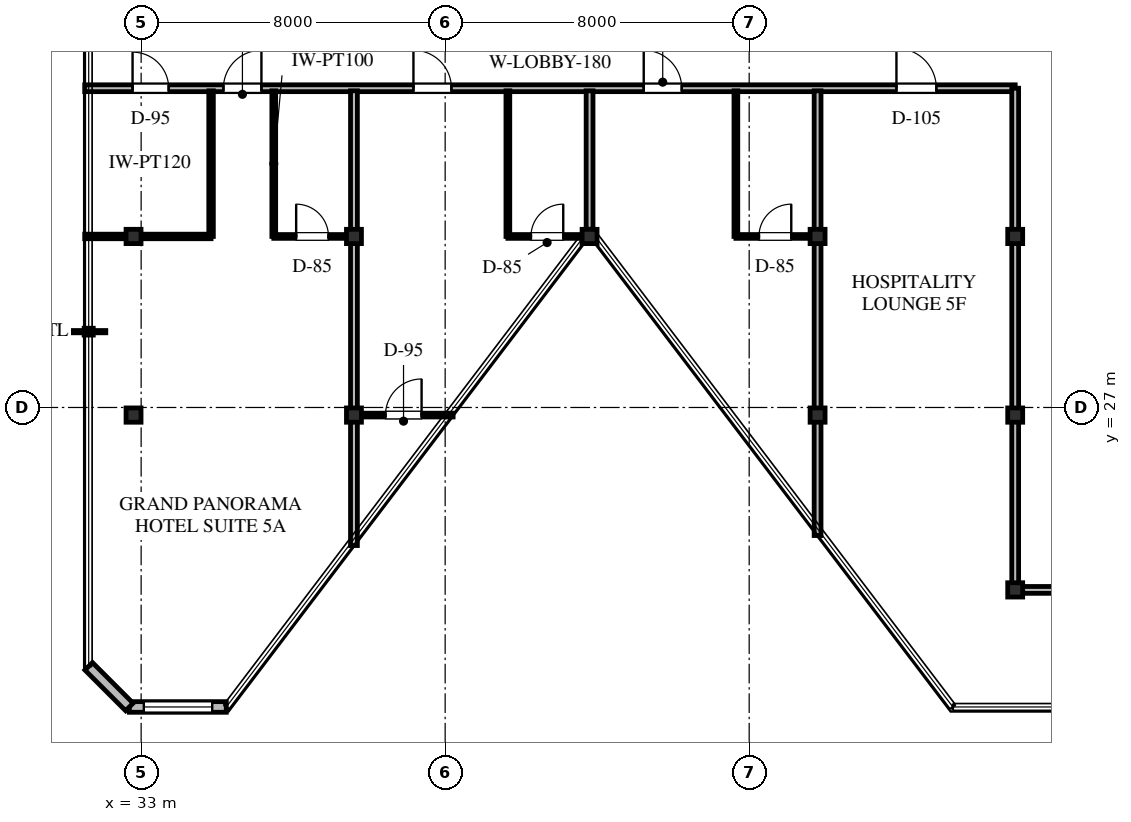
"""IFC4 building model, lengths in metres.
Left out: names, types, materials, properties, quantities, classifications, styles, units other than length and angle.
Written with IfcOpenShell. Run it as: python <this file> out.ifc"""

import sys

from ifc_helpers import new_model, si_unit, direction, frame, frame_2d, origin, origin_2d, place, context, subcontext, project, spatial, rectangle, i_section, extrude, element, fill, save


model = new_model("IFC4")
c1 = context("Model", 3, precision=1e-05, world=origin(), true_north=direction((0.0, 1.0)))
c2 = subcontext(c1, "Body", "Model", "MODEL_VIEW")
j1 = project(units=[si_unit("LENGTHUNIT", "METRE"), si_unit("PLANEANGLEUNIT", "RADIAN")], contexts=[c1])
p1 = place(None, origin())
s1 = spatial("IfcSite", under=j1, at=p1, CompositionType="ELEMENT")
p2 = place(p1, origin())
s2 = spatial("IfcBuilding", under=s1, at=p2, CompositionType="ELEMENT")
p3 = place(p2, frame((0.0, 0.0, 282.3)))
s3 = spatial("IfcBuildingStorey", under=s2, at=p3, CompositionType="ELEMENT", Elevation=282.3)
for number, where, z_axis, x_axis in (
    (1, (44.8, 31.5, 0.0), (0.0, 0.0, 1.0), (1.0, 0.0, 0.0)),
    (2, (50.8, 31.5, 0.0), (0.0, 0.0, 1.0), (1.0, 0.0, 0.0)),
    (3, (56.0, 31.5, 0.0), (0.0, 0.0, 1.0), (1.0, 0.0, 0.0)),
    (4, (38.6, 31.5, 0.0), (0.0, 0.0, 1.0), (1.0, 0.0, 0.0)),
    (5, (32.8, 31.5, 0.0), (0.0, 0.0, 1.0), (1.0, 0.0, 0.0)),
    (6, (38.6, 26.8, 0.0), (0.0, 0.0, 1.0), (1.0, 0.0, 0.0)),
    (7, (50.8, 26.8, 0.0), (0.0, 0.0, 1.0), (1.0, 0.0, 0.0)),
    (8, (56.0, 26.8, 0.0), (0.0, 0.0, 1.0), (1.0, 0.0, 0.0)),
    (9, (56.0, 22.2, 0.0), (0.0, 0.0, 1.0), (1.0, 0.0, 0.0)),
    (10, (32.8, 26.8, 0.0), (0.0, 0.0, 1.0), (1.0, 0.0, 0.0)),
):
    element("IfcColumn", number, at=place(p3, frame(where, z_axis=z_axis, x_axis=x_axis)), inside=s3, PredefinedType="COLUMN", context=c2, shape_type="SweptSolid", body=[
        extrude(i_section(OverallWidth=0.394, OverallDepth=0.376, WebThickness=0.017, FlangeThickness=0.028, FilletRadius=0.03, at=origin_2d()), origin(), (0.0, 0.0, 1.0), 3.6),
    ])
p4 = place(p3, frame((35.24, 19.12, 0.0), z_axis=(0.0, 0.0, 1.0), x_axis=(-1.0, 0.0, 0.0)))
e11 = element("IfcWall", 11, at=p4, inside=s3, PredefinedType="STANDARD", context=c2, shape_type="SweptSolid", body=[
    extrude(rectangle(XDim=2.551, YDim=0.28, at=frame_2d((1.275, 0.0))), origin(), (0.0, 0.0, 1.0), 3.365),
])
p5 = place(p4, frame((0.37, 0.0, 0.65)))
e12 = element("IfcOpeningElement", 12, at=p5, cuts=e11, PredefinedType="OPENING", context=c2, shape_type="SweptSolid", body=[
    extrude(rectangle(XDim=1.8, YDim=2.1, at=frame_2d((0.9, 1.05))), frame((0.0, 0.15, 0.0), z_axis=(0.0, -1.0, 0.0), x_axis=(1.0, 0.0, 0.0)), (0.0, 0.0, 1.0), 0.3),
])
p6 = place(p3, frame((32.69, 19.12, 0.0), z_axis=(0.0, 0.0, 1.0), x_axis=(-0.707106781187, 0.707106781187, 0.0)))
e13 = element("IfcWall", 13, at=p6, inside=s3, PredefinedType="STANDARD", context=c2, shape_type="SweptSolid", body=[
    extrude(rectangle(XDim=1.513, YDim=0.28, at=frame_2d((0.756, 0.0))), origin(), (0.0, 0.0, 1.0), 3.365),
])
p7 = place(p3, frame((31.515, 35.4, 0.0), z_axis=(0.0, 0.0, 1.0), x_axis=(1.0, 0.0, 0.0)))
e14 = element("IfcWall", 14, at=p7, inside=s3, PredefinedType="STANDARD", context=c2, shape_type="SweptSolid", body=[
    extrude(rectangle(XDim=24.485, YDim=0.18, at=frame_2d((12.243, 0.0))), origin(), (0.0, 0.0, 1.0), 2.754),
])
p8 = place(p7, frame((1.259, 0.0, 0.0)))
e15 = element("IfcOpeningElement", 15, at=p8, cuts=e14, PredefinedType="OPENING", context=c2, shape_type="SweptSolid", body=[
    extrude(rectangle(XDim=0.95, YDim=2.15, at=frame_2d((0.475, 1.075))), frame((0.0, 0.1, 0.0), z_axis=(0.0, -1.0, 0.0), x_axis=(1.0, 0.0, 0.0)), (0.0, 0.0, 1.0), 0.2),
])
p9 = place(p7, frame((3.65, 0.0, 0.0)))
e16 = element("IfcOpeningElement", 16, at=p9, cuts=e14, PredefinedType="OPENING", context=c2, shape_type="SweptSolid", body=[
    extrude(rectangle(XDim=1.0, YDim=2.15, at=frame_2d((0.5, 1.075))), frame((0.0, 0.1, 0.0), z_axis=(0.0, -1.0, 0.0), x_axis=(1.0, 0.0, 0.0)), (0.0, 0.0, 1.0), 0.2),
])
p10 = place(p7, frame((8.65, 0.0, 0.0)))
e17 = element("IfcOpeningElement", 17, at=p10, cuts=e14, PredefinedType="OPENING", context=c2, shape_type="SweptSolid", body=[
    extrude(rectangle(XDim=1.0, YDim=2.15, at=frame_2d((0.5, 1.075))), frame((0.0, 0.1, 0.0), z_axis=(0.0, -1.0, 0.0), x_axis=(1.0, 0.0, 0.0)), (0.0, 0.0, 1.0), 0.2),
])
p11 = place(p7, frame((14.71, 0.0, 0.0)))
e18 = element("IfcOpeningElement", 18, at=p11, cuts=e14, PredefinedType="OPENING", context=c2, shape_type="SweptSolid", body=[
    extrude(rectangle(XDim=1.0, YDim=2.15, at=frame_2d((0.5, 1.075))), frame((0.0, 0.1, 0.0), z_axis=(0.0, -1.0, 0.0), x_axis=(1.0, 0.0, 0.0)), (0.0, 0.0, 1.0), 0.2),
])
p12 = place(p7, frame((21.36, 0.0, 0.0)))
e19 = element("IfcOpeningElement", 19, at=p12, cuts=e14, PredefinedType="OPENING", context=c2, shape_type="SweptSolid", body=[
    extrude(rectangle(XDim=1.05, YDim=2.2, at=frame_2d((0.525, 1.1))), frame((0.0, 0.1, 0.0), z_axis=(0.0, -1.0, 0.0), x_axis=(1.0, 0.0, 0.0)), (0.0, 0.0, 1.0), 0.2),
])
p13 = place(p3, frame((56.0, 22.2, 0.0), z_axis=(0.0, 0.0, 1.0), x_axis=(0.0, 1.0, 0.0)))
e20 = element("IfcWall", 20, at=p13, inside=s3, PredefinedType="STANDARD", context=c2, shape_type="SweptSolid", body=[
    extrude(rectangle(XDim=13.2, YDim=0.18, at=frame_2d((6.6, 0.0))), origin(), (0.0, 0.0, 1.0), 2.754),
])
p14 = place(p3, frame((56.0, 22.2, 0.0), z_axis=(0.0, 0.0, 1.0), x_axis=(1.0, 0.0, 0.0)))
e21 = element("IfcWall", 21, at=p14, inside=s3, PredefinedType="STANDARD", context=c2, shape_type="SweptSolid", body=[
    extrude(rectangle(XDim=2.25, YDim=0.18, at=frame_2d((1.125, 0.0))), origin(), (0.0, 0.0, 1.0), 2.754),
])
p15 = place(p3, frame((34.84, 31.5, 0.0), z_axis=(0.0, 0.0, 1.0), x_axis=(0.0, 1.0, 0.0)))
e22 = element("IfcWall", 22, at=p15, inside=s3, PredefinedType="PARTITIONING", context=c2, shape_type="SweptSolid", body=[
    extrude(rectangle(XDim=3.832, YDim=0.12, at=frame_2d((1.916, 0.0))), origin(), (0.0, 0.0, 1.0), 2.754),
])
p16 = place(p3, frame((31.515, 31.5, 0.0), z_axis=(0.0, 0.0, 1.0), x_axis=(1.0, 0.0, 0.0)))
e23 = element("IfcWall", 23, at=p16, inside=s3, PredefinedType="PARTITIONING", context=c2, shape_type="SweptSolid", body=[
    extrude(rectangle(XDim=3.325, YDim=0.12, at=frame_2d((1.663, 0.0))), origin(), (0.0, 0.0, 1.0), 2.754),
])
p17 = place(p3, frame((36.49, 31.5, 0.0), z_axis=(0.0, 0.0, 1.0), x_axis=(0.0, 1.0, 0.0)))
e24 = element("IfcWall", 24, at=p17, inside=s3, PredefinedType="PARTITIONING", context=c2, shape_type="SweptSolid", body=[
    extrude(rectangle(XDim=3.832, YDim=0.1, at=frame_2d((1.916, 0.0))), origin(), (0.0, 0.0, 1.0), 2.754),
])
p18 = place(p3, frame((36.49, 31.5, 0.0), z_axis=(0.0, 0.0, 1.0), x_axis=(1.0, 0.0, 0.0)))
e25 = element("IfcWall", 25, at=p18, inside=s3, PredefinedType="PARTITIONING", context=c2, shape_type="SweptSolid", body=[
    extrude(rectangle(XDim=2.042, YDim=0.1, at=frame_2d((1.021, 0.0))), origin(), (0.0, 0.0, 1.0), 2.754),
])
p19 = place(p18, frame((0.589, 0.0, 0.0)))
e26 = element("IfcOpeningElement", 26, at=p19, cuts=e25, PredefinedType="OPENING", context=c2, shape_type="SweptSolid", body=[
    extrude(rectangle(XDim=0.85, YDim=2.1, at=frame_2d((0.425, 1.05))), frame((0.0, 0.06, 0.0), z_axis=(0.0, -1.0, 0.0), x_axis=(1.0, 0.0, 0.0)), (0.0, 0.0, 1.0), 0.12),
])
p20 = place(p3, frame((38.6, 23.367, 0.0), z_axis=(0.0, 0.0, 1.0), x_axis=(0.0, 1.0, 0.0)))
e27 = element("IfcWall", 27, at=p20, inside=s3, PredefinedType="STANDARD", context=c2, shape_type="SweptSolid", body=[
    extrude(rectangle(XDim=11.965, YDim=0.18, at=frame_2d((5.982, 0.0))), origin(), (0.0, 0.0, 1.0), 2.754),
])
p21 = place(p3, frame((38.668, 26.8, 0.0), z_axis=(0.0, 0.0, 1.0), x_axis=(1.0, 0.0, 0.0)))
e28 = element("IfcWall", 28, at=p21, inside=s3, PredefinedType="PARTITIONING", context=c2, shape_type="SweptSolid", body=[
    extrude(rectangle(XDim=2.541, YDim=0.1, at=frame_2d((1.271, 0.0))), origin(), (0.0, 0.0, 1.0), 2.754),
])
p22 = place(p21, frame((0.762, 0.0, 0.0)))
e29 = element("IfcOpeningElement", 29, at=p22, cuts=e28, PredefinedType="OPENING", context=c2, shape_type="SweptSolid", body=[
    extrude(rectangle(XDim=0.95, YDim=2.15, at=frame_2d((0.475, 1.075))), frame((0.0, 0.06, 0.0), z_axis=(0.0, -1.0, 0.0), x_axis=(1.0, 0.0, 0.0)), (0.0, 0.0, 1.0), 0.12),
])
p23 = place(p3, frame((42.65, 31.5, 0.0), z_axis=(0.0, 0.0, 1.0), x_axis=(0.0, 1.0, 0.0)))
e30 = element("IfcWall", 30, at=p23, inside=s3, PredefinedType="PARTITIONING", context=c2, shape_type="SweptSolid", body=[
    extrude(rectangle(XDim=3.832, YDim=0.1, at=frame_2d((1.916, 0.0))), origin(), (0.0, 0.0, 1.0), 2.754),
])
p24 = place(p3, frame((42.65, 31.5, 0.0), z_axis=(0.0, 0.0, 1.0), x_axis=(1.0, 0.0, 0.0)))
e31 = element("IfcWall", 31, at=p24, inside=s3, PredefinedType="PARTITIONING", context=c2, shape_type="SweptSolid", body=[
    extrude(rectangle(XDim=2.131, YDim=0.1, at=frame_2d((1.066, 0.0))), origin(), (0.0, 0.0, 1.0), 2.754),
])
p25 = place(p24, frame((0.607, 0.0, 0.0)))
e32 = element("IfcOpeningElement", 32, at=p25, cuts=e31, PredefinedType="OPENING", context=c2, shape_type="SweptSolid", body=[
    extrude(rectangle(XDim=0.85, YDim=2.1, at=frame_2d((0.425, 1.05))), frame((0.0, 0.06, 0.0), z_axis=(0.0, -1.0, 0.0), x_axis=(1.0, 0.0, 0.0)), (0.0, 0.0, 1.0), 0.12),
])
p26 = place(p3, frame((44.8, 31.525, 0.0), z_axis=(0.0, 0.0, 1.0), x_axis=(0.0, 1.0, 0.0)))
e33 = element("IfcWall", 33, at=p26, inside=s3, PredefinedType="STANDARD", context=c2, shape_type="SweptSolid", body=[
    extrude(rectangle(XDim=3.807, YDim=0.18, at=frame_2d((1.904, 0.0))), origin(), (0.0, 0.0, 1.0), 2.754),
])
p27 = place(p3, frame((48.65, 31.5, 0.0), z_axis=(0.0, 0.0, 1.0), x_axis=(0.0, 1.0, 0.0)))
e34 = element("IfcWall", 34, at=p27, inside=s3, PredefinedType="PARTITIONING", context=c2, shape_type="SweptSolid", body=[
    extrude(rectangle(XDim=3.832, YDim=0.1, at=frame_2d((1.916, 0.0))), origin(), (0.0, 0.0, 1.0), 2.754),
])
p28 = place(p3, frame((48.65, 31.5, 0.0), z_axis=(0.0, 0.0, 1.0), x_axis=(1.0, 0.0, 0.0)))
e35 = element("IfcWall", 35, at=p28, inside=s3, PredefinedType="PARTITIONING", context=c2, shape_type="SweptSolid", body=[
    extrude(rectangle(XDim=2.082, YDim=0.1, at=frame_2d((1.041, 0.0))), origin(), (0.0, 0.0, 1.0), 2.754),
])
p29 = place(p28, frame((0.607, 0.0, 0.0)))
e36 = element("IfcOpeningElement", 36, at=p29, cuts=e35, PredefinedType="OPENING", context=c2, shape_type="SweptSolid", body=[
    extrude(rectangle(XDim=0.85, YDim=2.1, at=frame_2d((0.425, 1.05))), frame((0.0, 0.06, 0.0), z_axis=(0.0, -1.0, 0.0), x_axis=(1.0, 0.0, 0.0)), (0.0, 0.0, 1.0), 0.12),
])
p30 = place(p3, frame((50.8, 23.63, 0.0), z_axis=(0.0, 0.0, 1.0), x_axis=(0.0, 1.0, 0.0)))
e37 = element("IfcWall", 37, at=p30, inside=s3, PredefinedType="STANDARD", context=c2, shape_type="SweptSolid", body=[
    extrude(rectangle(XDim=11.702, YDim=0.18, at=frame_2d((5.851, 0.0))), origin(), (0.0, 0.0, 1.0), 2.754),
])
p31 = place(p5, origin())
e38 = element("IfcWindow", 38, at=p31, inside=s3, PartitioningType="SINGLE_PANEL", PredefinedType="WINDOW", context=c2, shape_type="SweptSolid", body=[
    extrude(rectangle(XDim=1.8, YDim=2.1, at=frame_2d((0.9, 1.05))), frame((0.0, 0.03, 0.0), z_axis=(0.0, -1.0, 0.0), x_axis=(1.0, 0.0, 0.0)), (0.0, 0.0, 1.0), 0.06),
])
fill(e12, e38)
p32 = place(p8, origin())
e39 = element("IfcDoor", 39, at=p32, inside=s3, OperationType="SINGLE_SWING_LEFT", PredefinedType="DOOR", context=c2, shape_type="SweptSolid", body=[
    extrude(rectangle(XDim=0.95, YDim=2.15, at=frame_2d((0.475, 1.075))), frame((0.0, 0.025, 0.0), z_axis=(0.0, -1.0, 0.0), x_axis=(1.0, 0.0, 0.0)), (0.0, 0.0, 1.0), 0.05),
])
fill(e15, e39)
p33 = place(p9, origin())
e40 = element("IfcDoor", 40, at=p33, inside=s3, OperationType="SINGLE_SWING_RIGHT", PredefinedType="DOOR", context=c2, shape_type="SweptSolid", body=[
    extrude(rectangle(XDim=1.0, YDim=2.15, at=frame_2d((0.5, 1.075))), frame((0.0, 0.025, 0.0), z_axis=(0.0, -1.0, 0.0), x_axis=(1.0, 0.0, 0.0)), (0.0, 0.0, 1.0), 0.05),
])
fill(e16, e40)
p34 = place(p19, origin())
e41 = element("IfcDoor", 41, at=p34, inside=s3, OperationType="SINGLE_SWING_LEFT", PredefinedType="DOOR", context=c2, shape_type="SweptSolid", body=[
    extrude(rectangle(XDim=0.85, YDim=2.1, at=frame_2d((0.425, 1.05))), frame((0.0, 0.025, 0.0), z_axis=(0.0, -1.0, 0.0), x_axis=(1.0, 0.0, 0.0)), (0.0, 0.0, 1.0), 0.05),
])
fill(e26, e41)
p35 = place(p22, origin())
e42 = element("IfcDoor", 42, at=p35, inside=s3, OperationType="SINGLE_SWING_RIGHT", PredefinedType="DOOR", context=c2, shape_type="SweptSolid", body=[
    extrude(rectangle(XDim=0.95, YDim=2.15, at=frame_2d((0.475, 1.075))), frame((0.0, 0.025, 0.0), z_axis=(0.0, -1.0, 0.0), x_axis=(1.0, 0.0, 0.0)), (0.0, 0.0, 1.0), 0.05),
])
fill(e29, e42)
p36 = place(p10, origin())
e43 = element("IfcDoor", 43, at=p36, inside=s3, OperationType="SINGLE_SWING_LEFT", PredefinedType="DOOR", context=c2, shape_type="SweptSolid", body=[
    extrude(rectangle(XDim=1.0, YDim=2.15, at=frame_2d((0.5, 1.075))), frame((0.0, 0.025, 0.0), z_axis=(0.0, -1.0, 0.0), x_axis=(1.0, 0.0, 0.0)), (0.0, 0.0, 1.0), 0.05),
])
fill(e17, e43)
p37 = place(p25, origin())
e44 = element("IfcDoor", 44, at=p37, inside=s3, OperationType="SINGLE_SWING_RIGHT", PredefinedType="DOOR", context=c2, shape_type="SweptSolid", body=[
    extrude(rectangle(XDim=0.85, YDim=2.1, at=frame_2d((0.425, 1.05))), frame((0.0, 0.025, 0.0), z_axis=(0.0, -1.0, 0.0), x_axis=(1.0, 0.0, 0.0)), (0.0, 0.0, 1.0), 0.05),
])
fill(e32, e44)
p38 = place(p11, origin())
e45 = element("IfcDoor", 45, at=p38, inside=s3, OperationType="SINGLE_SWING_LEFT", PredefinedType="DOOR", context=c2, shape_type="SweptSolid", body=[
    extrude(rectangle(XDim=1.0, YDim=2.15, at=frame_2d((0.5, 1.075))), frame((0.0, 0.025, 0.0), z_axis=(0.0, -1.0, 0.0), x_axis=(1.0, 0.0, 0.0)), (0.0, 0.0, 1.0), 0.05),
])
fill(e18, e45)
p39 = place(p29, origin())
e46 = element("IfcDoor", 46, at=p39, inside=s3, OperationType="SINGLE_SWING_RIGHT", PredefinedType="DOOR", context=c2, shape_type="SweptSolid", body=[
    extrude(rectangle(XDim=0.85, YDim=2.1, at=frame_2d((0.425, 1.05))), frame((0.0, 0.025, 0.0), z_axis=(0.0, -1.0, 0.0), x_axis=(1.0, 0.0, 0.0)), (0.0, 0.0, 1.0), 0.05),
])
fill(e36, e46)
p40 = place(p12, origin())
e47 = element("IfcDoor", 47, at=p40, inside=s3, OperationType="SINGLE_SWING_LEFT", PredefinedType="DOOR", context=c2, shape_type="SweptSolid", body=[
    extrude(rectangle(XDim=1.05, YDim=2.2, at=frame_2d((0.525, 1.1))), frame((0.0, 0.025, 0.0), z_axis=(0.0, -1.0, 0.0), x_axis=(1.0, 0.0, 0.0)), (0.0, 0.0, 1.0), 0.05),
])
fill(e19, e47)
save(model, sys.argv[1])
